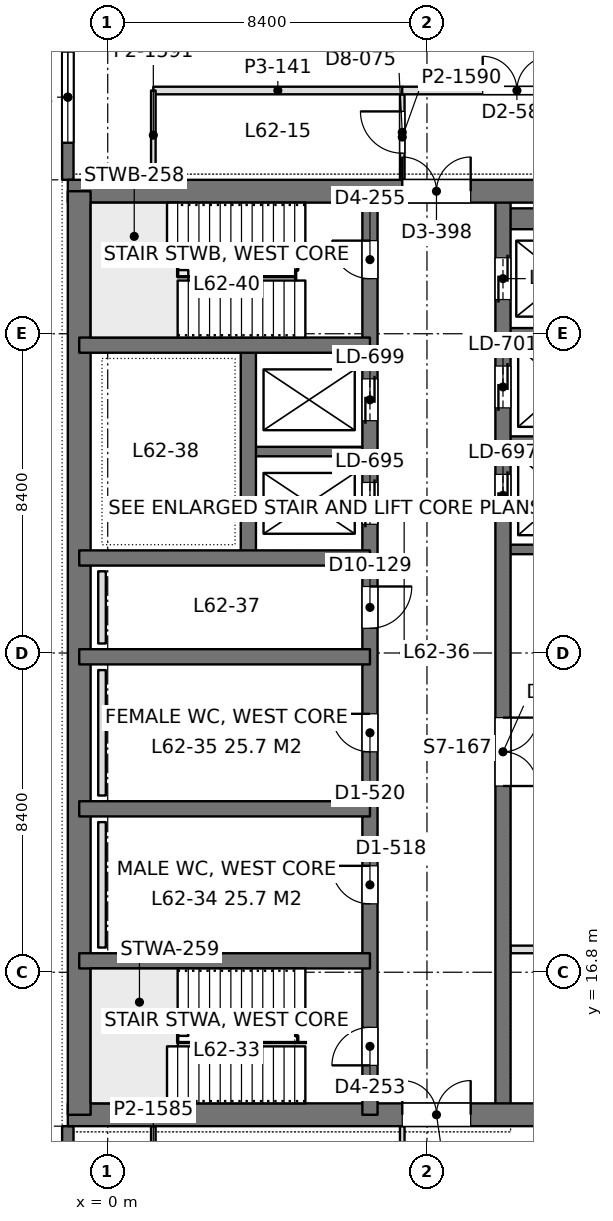
"""IFC4 building model, lengths in metres.
Left out: names, types, materials, properties, quantities, classifications, styles, units other than length and angle.
Written with IfcOpenShell. Run it as: python <this file> out.ifc"""

import sys

from ifc_helpers import new_model, si_unit, direction, frame, frame_2d, origin, place, context, subcontext, project, spatial, rectangle, extrude, element, fill, save


model = new_model("IFC4")
c1 = context("Model", 3, precision=1e-05, world=origin(), true_north=direction((0.0, 1.0)))
c2 = subcontext(c1, "Body", "Model", "MODEL_VIEW")
j1 = project(units=[si_unit("LENGTHUNIT", "METRE"), si_unit("PLANEANGLEUNIT", "RADIAN")], contexts=[c1])
p1 = place(None, origin())
s1 = spatial("IfcSite", under=j1, at=p1, CompositionType="ELEMENT")
p2 = place(p1, origin())
s2 = spatial("IfcBuilding", under=s1, at=p2, CompositionType="ELEMENT")
p3 = place(p2, frame((0.0, 0.0, 272.7)))
s3 = spatial("IfcBuildingStorey", under=s2, at=p3, CompositionType="ELEMENT", Elevation=272.7)
p4 = place(p3, frame((-1.05, 13.05, 0.0), z_axis=(0.0, 0.0, 1.0), x_axis=(1.0, 0.0, 0.0)))
e1 = element("IfcWall", 1, at=p4, inside=s3, PredefinedType="SHEAR", context=c2, shape_type="SweptSolid", body=[
    extrude(rectangle(XDim=17.7, YDim=0.6, at=frame_2d((8.85, 0.0))), origin(), (0.0, 0.0, 1.0), 4.5),
])
p5 = place(p4, frame((8.8, 0.0, 0.0)))
e2 = element("IfcOpeningElement", 2, at=p5, cuts=e1, PredefinedType="OPENING", context=c2, shape_type="SweptSolid", body=[
    extrude(rectangle(XDim=1.8, YDim=2.4, at=frame_2d((0.9, 1.2))), frame((0.0, 0.31, 0.0), z_axis=(0.0, -1.0, 0.0), x_axis=(1.0, 0.0, 0.0)), (0.0, 0.0, 1.0), 0.62),
])
p6 = place(p3, frame((-1.05, 37.35, 0.0), z_axis=(0.0, 0.0, 1.0), x_axis=(1.0, 0.0, 0.0)))
e3 = element("IfcWall", 3, at=p6, inside=s3, PredefinedType="SHEAR", context=c2, shape_type="SweptSolid", body=[
    extrude(rectangle(XDim=17.7, YDim=0.6, at=frame_2d((8.85, 0.0))), origin(), (0.0, 0.0, 1.0), 4.5),
])
p7 = place(p6, frame((8.8, 0.0, 0.0)))
e4 = element("IfcOpeningElement", 4, at=p7, cuts=e3, PredefinedType="OPENING", context=c2, shape_type="SweptSolid", body=[
    extrude(rectangle(XDim=1.8, YDim=2.4, at=frame_2d((0.9, 1.2))), frame((0.0, 0.31, 0.0), z_axis=(0.0, -1.0, 0.0), x_axis=(1.0, 0.0, 0.0)), (0.0, 0.0, 1.0), 0.62),
])
p8 = place(p3, frame((-0.75, 13.05, 0.0), z_axis=(0.0, 0.0, 1.0), x_axis=(0.0, 1.0, 0.0)))
e5 = element("IfcWall", 5, at=p8, inside=s3, PredefinedType="SHEAR", context=c2, shape_type="SweptSolid", body=[
    extrude(rectangle(XDim=24.3, YDim=0.6, at=frame_2d((12.15, 0.0))), origin(), (0.0, 0.0, 1.0), 4.5),
])
p9 = place(p3, frame((6.9, 13.05, 0.0), z_axis=(0.0, 0.0, 1.0), x_axis=(0.0, 1.0, 0.0)))
e6 = element("IfcWall", 6, at=p9, inside=s3, PredefinedType="SHEAR", context=c2, shape_type="SweptSolid", body=[
    extrude(rectangle(XDim=24.3, YDim=0.4, at=frame_2d((12.15, 0.0))), origin(), (0.0, 0.0, 1.0), 4.5),
])
p10 = place(p9, frame((1.3, 0.0, 0.0)))
e7 = element("IfcOpeningElement", 7, at=p10, cuts=e6, PredefinedType="OPENING", context=c2, shape_type="SweptSolid", body=[
    extrude(rectangle(XDim=1.0, YDim=2.2, at=frame_2d((0.5, 1.1))), frame((0.0, 0.21, 0.0), z_axis=(0.0, -1.0, 0.0), x_axis=(1.0, 0.0, 0.0)), (0.0, 0.0, 1.0), 0.42),
])
p11 = place(p9, frame((22.0, 0.0, 0.0)))
e8 = element("IfcOpeningElement", 8, at=p11, cuts=e6, PredefinedType="OPENING", context=c2, shape_type="SweptSolid", body=[
    extrude(rectangle(XDim=1.0, YDim=2.2, at=frame_2d((0.5, 1.1))), frame((0.0, 0.21, 0.0), z_axis=(0.0, -1.0, 0.0), x_axis=(1.0, 0.0, 0.0)), (0.0, 0.0, 1.0), 0.42),
])
p12 = place(p9, frame((5.55, 0.0, 0.0)))
e9 = element("IfcOpeningElement", 9, at=p12, cuts=e6, PredefinedType="OPENING", context=c2, shape_type="SweptSolid", body=[
    extrude(rectangle(XDim=1.0, YDim=2.2, at=frame_2d((0.5, 1.1))), frame((0.0, 0.21, 0.0), z_axis=(0.0, -1.0, 0.0), x_axis=(1.0, 0.0, 0.0)), (0.0, 0.0, 1.0), 0.42),
])
p13 = place(p9, frame((9.55, 0.0, 0.0)))
e10 = element("IfcOpeningElement", 10, at=p13, cuts=e6, PredefinedType="OPENING", context=c2, shape_type="SweptSolid", body=[
    extrude(rectangle(XDim=1.0, YDim=2.2, at=frame_2d((0.5, 1.1))), frame((0.0, 0.21, 0.0), z_axis=(0.0, -1.0, 0.0), x_axis=(1.0, 0.0, 0.0)), (0.0, 0.0, 1.0), 0.42),
])
p14 = place(p9, frame((12.8, 0.0, 0.0)))
e11 = element("IfcOpeningElement", 11, at=p14, cuts=e6, PredefinedType="OPENING", context=c2, shape_type="SweptSolid", body=[
    extrude(rectangle(XDim=1.1, YDim=2.2, at=frame_2d((0.55, 1.1))), frame((0.0, 0.21, 0.0), z_axis=(0.0, -1.0, 0.0), x_axis=(1.0, 0.0, 0.0)), (0.0, 0.0, 1.0), 0.42),
])
p15 = place(p9, frame((15.538, 0.0, 0.0)))
e12 = element("IfcOpeningElement", 12, at=p15, cuts=e6, PredefinedType="OPENING", context=c2, shape_type="SweptSolid", body=[
    extrude(rectangle(XDim=1.1, YDim=2.2, at=frame_2d((0.55, 1.1))), frame((0.0, 0.21, 0.0), z_axis=(0.0, -1.0, 0.0), x_axis=(1.0, 0.0, 0.0)), (0.0, 0.0, 1.0), 0.42),
])
p16 = place(p9, frame((18.262, 0.0, 0.0)))
e13 = element("IfcOpeningElement", 13, at=p16, cuts=e6, PredefinedType="OPENING", context=c2, shape_type="SweptSolid", body=[
    extrude(rectangle(XDim=1.1, YDim=2.2, at=frame_2d((0.55, 1.1))), frame((0.0, 0.21, 0.0), z_axis=(0.0, -1.0, 0.0), x_axis=(1.0, 0.0, 0.0)), (0.0, 0.0, 1.0), 0.42),
])
p17 = place(p3, frame((10.4, 13.05, 0.0), z_axis=(0.0, 0.0, 1.0), x_axis=(0.0, 1.0, 0.0)))
e14 = element("IfcWall", 14, at=p17, inside=s3, PredefinedType="SHEAR", context=c2, shape_type="SweptSolid", body=[
    extrude(rectangle(XDim=24.3, YDim=0.4, at=frame_2d((12.15, 0.0))), origin(), (0.0, 0.0, 1.0), 4.5),
])
p18 = place(p17, frame((15.75, 0.0, 0.0)))
e15 = element("IfcOpeningElement", 15, at=p18, cuts=e14, PredefinedType="OPENING", context=c2, shape_type="SweptSolid", body=[
    extrude(rectangle(XDim=1.1, YDim=2.2, at=frame_2d((0.55, 1.1))), frame((0.0, 0.21, 0.0), z_axis=(0.0, -1.0, 0.0), x_axis=(1.0, 0.0, 0.0)), (0.0, 0.0, 1.0), 0.42),
])
p19 = place(p17, frame((18.6, 0.0, 0.0)))
e16 = element("IfcOpeningElement", 16, at=p19, cuts=e14, PredefinedType="OPENING", context=c2, shape_type="SweptSolid", body=[
    extrude(rectangle(XDim=1.1, YDim=2.2, at=frame_2d((0.55, 1.1))), frame((0.0, 0.21, 0.0), z_axis=(0.0, -1.0, 0.0), x_axis=(1.0, 0.0, 0.0)), (0.0, 0.0, 1.0), 0.42),
])
p20 = place(p17, frame((21.45, 0.0, 0.0)))
e17 = element("IfcOpeningElement", 17, at=p20, cuts=e14, PredefinedType="OPENING", context=c2, shape_type="SweptSolid", body=[
    extrude(rectangle(XDim=1.1, YDim=2.2, at=frame_2d((0.55, 1.1))), frame((0.0, 0.21, 0.0), z_axis=(0.0, -1.0, 0.0), x_axis=(1.0, 0.0, 0.0)), (0.0, 0.0, 1.0), 0.42),
])
p21 = place(p17, frame((8.65, 0.0, 0.0)))
e18 = element("IfcOpeningElement", 18, at=p21, cuts=e14, PredefinedType="OPENING", context=c2, shape_type="SweptSolid", body=[
    extrude(rectangle(XDim=1.8, YDim=2.4, at=frame_2d((0.9, 1.2))), frame((0.0, 0.21, 0.0), z_axis=(0.0, -1.0, 0.0), x_axis=(1.0, 0.0, 0.0)), (0.0, 0.0, 1.0), 0.42),
])
for number, where, z_axis, x_axis in (
    (19, (-0.75, 17.1, 0.0), (0.0, 0.0, 1.0), (1.0, 0.0, 0.0)),
    (20, (-0.75, 21.1, 0.0), (0.0, 0.0, 1.0), (1.0, 0.0, 0.0)),
    (21, (-0.75, 25.1, 0.0), (0.0, 0.0, 1.0), (1.0, 0.0, 0.0)),
    (22, (-0.75, 27.7, 0.0), (0.0, 0.0, 1.0), (1.0, 0.0, 0.0)),
    (23, (-0.75, 33.3, 0.0), (0.0, 0.0, 1.0), (1.0, 0.0, 0.0)),
):
    element("IfcWall", number, at=place(p3, frame(where, z_axis=z_axis, x_axis=x_axis)), inside=s3, PredefinedType="SHEAR", context=c2, shape_type="SweptSolid", body=[
        extrude(rectangle(XDim=7.65, YDim=0.4, at=frame_2d((3.825, 0.0))), origin(), (0.0, 0.0, 1.0), 4.5),
    ])
p22 = place(p3, frame((3.7, 27.7, 0.0), z_axis=(0.0, 0.0, 1.0), x_axis=(0.0, 1.0, 0.0)))
e24 = element("IfcWall", 24, at=p22, inside=s3, PredefinedType="SHEAR", context=c2, shape_type="SweptSolid", body=[
    extrude(rectangle(XDim=5.6, YDim=0.4, at=frame_2d((2.8, 0.0))), origin(), (0.0, 0.0, 1.0), 4.5),
])
p23 = place(p3, frame((3.7, 30.5, 0.0), z_axis=(0.0, 0.0, 1.0), x_axis=(1.0, 0.0, 0.0)))
e25 = element("IfcWall", 25, at=p23, inside=s3, PredefinedType="SHEAR", context=c2, shape_type="SweptSolid", body=[
    extrude(rectangle(XDim=3.2, YDim=0.25, at=frame_2d((1.6, 0.0))), origin(), (0.0, 0.0, 1.0), 4.5),
])
p24 = place(p3, frame((10.4, 27.925, 0.0), z_axis=(0.0, 0.0, 1.0), x_axis=(1.0, 0.0, 0.0)))
e26 = element("IfcWall", 26, at=p24, inside=s3, PredefinedType="SHEAR", context=c2, shape_type="SweptSolid", body=[
    extrude(rectangle(XDim=5.95, YDim=0.25, at=frame_2d((2.975, 0.0))), origin(), (0.0, 0.0, 1.0), 4.5),
])
for number, where, z_axis, x_axis in (
    (27, (10.4, 30.775, 0.0), (0.0, 0.0, 1.0), (1.0, 0.0, 0.0)),
    (28, (10.4, 33.625, 0.0), (0.0, 0.0, 1.0), (1.0, 0.0, 0.0)),
):
    element("IfcWall", number, at=place(p3, frame(where, z_axis=z_axis, x_axis=x_axis)), inside=s3, PredefinedType="SHEAR", context=c2, shape_type="SweptSolid", body=[
        extrude(rectangle(XDim=3.2, YDim=0.25, at=frame_2d((1.6, 0.0))), origin(), (0.0, 0.0, 1.0), 4.5),
    ])
p25 = place(p3, frame((10.4, 36.625, 0.0), z_axis=(0.0, 0.0, 1.0), x_axis=(1.0, 0.0, 0.0)))
e29 = element("IfcWall", 29, at=p25, inside=s3, PredefinedType="SHEAR", context=c2, shape_type="SweptSolid", body=[
    extrude(rectangle(XDim=3.2, YDim=0.55, at=frame_2d((1.6, 0.0))), origin(), (0.0, 0.0, 1.0), 4.5),
])
p26 = place(p3, frame((-1.05, 8.4, 0.0), z_axis=(0.0, 0.0, 1.0), x_axis=(0.0, 1.0, 0.0)))
e30 = element("IfcWall", 30, at=p26, inside=s3, PredefinedType="SOLIDWALL", context=c2, shape_type="SweptSolid", body=[
    extrude(rectangle(XDim=4.35, YDim=0.3, at=frame_2d((2.175, 0.0))), origin(), (0.0, 0.0, 1.0), 4.35),
])
p27 = place(p26, frame((0.975, 0.0, 0.9)))
e31 = element("IfcOpeningElement", 31, at=p27, cuts=e30, PredefinedType="OPENING", context=c2, shape_type="SweptSolid", body=[
    extrude(rectangle(XDim=2.4, YDim=1.9, at=frame_2d((1.2, 0.95))), frame((0.0, 0.16, 0.0), z_axis=(0.0, -1.0, 0.0), x_axis=(1.0, 0.0, 0.0)), (0.0, 0.0, 1.0), 0.32),
])
p28 = place(p3, frame((-1.05, 37.65, 0.0), z_axis=(0.0, 0.0, 1.0), x_axis=(0.0, 1.0, 0.0)))
e32 = element("IfcWall", 32, at=p28, inside=s3, PredefinedType="SOLIDWALL", context=c2, shape_type="SweptSolid", body=[
    extrude(rectangle(XDim=4.35, YDim=0.3, at=frame_2d((2.175, 0.0))), origin(), (0.0, 0.0, 1.0), 4.35),
])
p29 = place(p28, frame((0.975, 0.0, 0.9)))
e33 = element("IfcOpeningElement", 33, at=p29, cuts=e32, PredefinedType="OPENING", context=c2, shape_type="SweptSolid", body=[
    extrude(rectangle(XDim=2.4, YDim=1.9, at=frame_2d((1.2, 0.95))), frame((0.0, 0.16, 0.0), z_axis=(0.0, -1.0, 0.0), x_axis=(1.0, 0.0, 0.0)), (0.0, 0.0, 1.0), 0.32),
])
p30 = place(p3, frame((10.598, 17.4, 0.0), z_axis=(0.0, 0.0, 1.0), x_axis=(1.0, 0.0, 0.0)))
e34 = element("IfcWall", 34, at=p30, inside=s3, PredefinedType="PARTITIONING", context=c2, shape_type="SweptSolid", body=[
    extrude(rectangle(XDim=5.904, YDim=0.2, at=frame_2d((2.952, 0.0))), origin(), (0.0, 0.0, 1.0), 3.8),
])
p31 = place(p3, frame((7.75, 10.498, 0.0), z_axis=(0.0, 0.0, 1.0), x_axis=(0.0, 1.0, 0.0)))
e35 = element("IfcWall", 35, at=p31, inside=s3, PredefinedType="PARTITIONING", context=c2, shape_type="SweptSolid", body=[
    extrude(rectangle(XDim=2.254, YDim=0.12, at=frame_2d((1.127, 0.0))), origin(), (0.0, 0.0, 1.0), 4.35),
])
p32 = place(p31, frame((0.452, 0.0, 0.0)))
e36 = element("IfcOpeningElement", 36, at=p32, cuts=e35, PredefinedType="OPENING", context=c2, shape_type="SweptSolid", body=[
    extrude(rectangle(XDim=1.1, YDim=2.4, at=frame_2d((0.55, 1.2))), frame((0.0, 0.07, 0.0), z_axis=(0.0, -1.0, 0.0), x_axis=(1.0, 0.0, 0.0)), (0.0, 0.0, 1.0), 0.14),
])
p33 = place(p3, frame((1.2, 10.4, 0.0), z_axis=(0.0, 0.0, 1.0), x_axis=(0.0, 1.0, 0.0)))
e37 = element("IfcWall", 37, at=p33, inside=s3, PredefinedType="PARTITIONING", context=c2, shape_type="SweptSolid", body=[
    extrude(rectangle(XDim=2.352, YDim=0.12, at=frame_2d((1.176, 0.0))), origin(), (0.0, 0.0, 1.0), 4.35),
])
p34 = place(p3, frame((7.748, 40.0, 0.0), z_axis=(0.0, 0.0, 1.0), x_axis=(1.0, 0.0, 0.0)))
e38 = element("IfcWall", 38, at=p34, inside=s3, PredefinedType="PARTITIONING", context=c2, shape_type="SweptSolid", body=[
    extrude(rectangle(XDim=41.452, YDim=0.2, at=frame_2d((20.726, 0.0))), origin(), (0.0, 0.0, 1.0), 3.8),
])
p35 = place(p34, frame((2.119, 0.0, 0.0)))
e39 = element("IfcOpeningElement", 39, at=p35, cuts=e38, PredefinedType="OPENING", context=c2, shape_type="SweptSolid", body=[
    extrude(rectangle(XDim=1.8, YDim=2.2, at=frame_2d((0.9, 1.1))), frame((0.0, 0.11, 0.0), z_axis=(0.0, -1.0, 0.0), x_axis=(1.0, 0.0, 0.0)), (0.0, 0.0, 1.0), 0.22),
])
p36 = place(p34, frame((5.135, 0.0, 0.0)))
e40 = element("IfcOpeningElement", 40, at=p36, cuts=e38, PredefinedType="OPENING", context=c2, shape_type="SweptSolid", body=[
    extrude(rectangle(XDim=1.8, YDim=2.2, at=frame_2d((0.9, 1.1))), frame((0.0, 0.11, 0.0), z_axis=(0.0, -1.0, 0.0), x_axis=(1.0, 0.0, 0.0)), (0.0, 0.0, 1.0), 0.22),
])
p37 = place(p34, frame((18.952, 0.0, 0.0)))
e41 = element("IfcOpeningElement", 41, at=p37, cuts=e38, PredefinedType="OPENING", context=c2, shape_type="SweptSolid", body=[
    extrude(rectangle(XDim=1.8, YDim=2.2, at=frame_2d((0.9, 1.1))), frame((0.0, 0.11, 0.0), z_axis=(0.0, -1.0, 0.0), x_axis=(1.0, 0.0, 0.0)), (0.0, 0.0, 1.0), 0.22),
])
p38 = place(p34, frame((29.752, 0.0, 0.0)))
e42 = element("IfcOpeningElement", 42, at=p38, cuts=e38, PredefinedType="OPENING", context=c2, shape_type="SweptSolid", body=[
    extrude(rectangle(XDim=1.8, YDim=2.2, at=frame_2d((0.9, 1.1))), frame((0.0, 0.11, 0.0), z_axis=(0.0, -1.0, 0.0), x_axis=(1.0, 0.0, 0.0)), (0.0, 0.0, 1.0), 0.22),
])
p39 = place(p3, frame((7.75, 37.648, 0.0), z_axis=(0.0, 0.0, 1.0), x_axis=(0.0, 1.0, 0.0)))
e43 = element("IfcWall", 43, at=p39, inside=s3, PredefinedType="PARTITIONING", context=c2, shape_type="SweptSolid", body=[
    extrude(rectangle(XDim=2.254, YDim=0.12, at=frame_2d((1.127, 0.0))), origin(), (0.0, 0.0, 1.0), 4.35),
])
p40 = place(p39, frame((0.702, 0.0, 0.0)))
e44 = element("IfcOpeningElement", 44, at=p40, cuts=e43, PredefinedType="OPENING", context=c2, shape_type="SweptSolid", body=[
    extrude(rectangle(XDim=1.1, YDim=2.4, at=frame_2d((0.55, 1.2))), frame((0.0, 0.07, 0.0), z_axis=(0.0, -1.0, 0.0), x_axis=(1.0, 0.0, 0.0)), (0.0, 0.0, 1.0), 0.14),
])
p41 = place(p3, frame((1.2, 40.0, 0.0), z_axis=(0.0, 0.0, 1.0), x_axis=(1.0, 0.0, 0.0)))
e45 = element("IfcWall", 45, at=p41, inside=s3, PredefinedType="PARTITIONING", context=c2, shape_type="SweptSolid", body=[
    extrude(rectangle(XDim=6.552, YDim=0.2, at=frame_2d((3.276, 0.0))), origin(), (0.0, 0.0, 1.0), 3.99),
])
p42 = place(p3, frame((1.2, 37.648, 0.0), z_axis=(0.0, 0.0, 1.0), x_axis=(0.0, 1.0, 0.0)))
e46 = element("IfcWall", 46, at=p42, inside=s3, PredefinedType="PARTITIONING", context=c2, shape_type="SweptSolid", body=[
    extrude(rectangle(XDim=2.352, YDim=0.12, at=frame_2d((1.176, 0.0))), origin(), (0.0, 0.0, 1.0), 4.35),
])
for number, where, z_axis, x_axis in (
    (47, (-0.15, 17.45, 0.0), (0.0, 0.0, 1.0), (0.0, 1.0, 0.0)),
    (48, (-0.15, 21.45, 0.0), (0.0, 0.0, 1.0), (0.0, 1.0, 0.0)),
):
    element("IfcWall", number, at=place(p3, frame(where, z_axis=z_axis, x_axis=x_axis)), inside=s3, PredefinedType="PLUMBINGWALL", context=c2, shape_type="SweptSolid", body=[
        extrude(rectangle(XDim=3.3, YDim=0.2, at=frame_2d((1.65, 0.0))), origin(), (0.0, 0.0, 1.0), 1.2),
    ])
p43 = place(p3, frame((-0.15, 25.45, 0.0), z_axis=(0.0, 0.0, 1.0), x_axis=(0.0, 1.0, 0.0)))
e49 = element("IfcWall", 49, at=p43, inside=s3, PredefinedType="PLUMBINGWALL", context=c2, shape_type="SweptSolid", body=[
    extrude(rectangle(XDim=1.9, YDim=0.2, at=frame_2d((0.95, 0.0))), origin(), (0.0, 0.0, 1.0), 1.2),
])
p44 = place(p29, origin())
e50 = element("IfcWindow", 50, at=p44, inside=s3, PartitioningType="SINGLE_PANEL", PredefinedType="WINDOW", context=c2, shape_type="SweptSolid", body=[
    extrude(rectangle(XDim=2.4, YDim=1.9, at=frame_2d((1.2, 0.95))), frame((0.0, 0.03, 0.0), z_axis=(0.0, -1.0, 0.0), x_axis=(1.0, 0.0, 0.0)), (0.0, 0.0, 1.0), 0.06),
])
fill(e33, e50)
p45 = place(p5, origin())
e51 = element("IfcDoor", 51, at=p45, inside=s3, OperationType="DOUBLE_DOOR_SINGLE_SWING", PredefinedType="DOOR", context=c2, shape_type="SweptSolid", body=[
    extrude(rectangle(XDim=1.8, YDim=2.4, at=frame_2d((0.9, 1.2))), frame((0.0, 0.025, 0.0), z_axis=(0.0, -1.0, 0.0), x_axis=(1.0, 0.0, 0.0)), (0.0, 0.0, 1.0), 0.05),
])
fill(e2, e51)
p46 = place(p7, origin())
e52 = element("IfcDoor", 52, at=p46, inside=s3, OperationType="DOUBLE_DOOR_SINGLE_SWING", PredefinedType="DOOR", context=c2, shape_type="SweptSolid", body=[
    extrude(rectangle(XDim=1.8, YDim=2.4, at=frame_2d((0.9, 1.2))), frame((0.0, 0.025, 0.0), z_axis=(0.0, -1.0, 0.0), x_axis=(1.0, 0.0, 0.0)), (0.0, 0.0, 1.0), 0.05),
])
fill(e4, e52)
p47 = place(p10, origin())
e53 = element("IfcDoor", 53, at=p47, inside=s3, OperationType="SINGLE_SWING_LEFT", PredefinedType="DOOR", context=c2, shape_type="SweptSolid", body=[
    extrude(rectangle(XDim=1.0, YDim=2.2, at=frame_2d((0.5, 1.1))), frame((0.0, 0.025, 0.0), z_axis=(0.0, -1.0, 0.0), x_axis=(1.0, 0.0, 0.0)), (0.0, 0.0, 1.0), 0.05),
])
fill(e7, e53)
p48 = place(p11, origin())
e54 = element("IfcDoor", 54, at=p48, inside=s3, OperationType="SINGLE_SWING_RIGHT", PredefinedType="DOOR", context=c2, shape_type="SweptSolid", body=[
    extrude(rectangle(XDim=1.0, YDim=2.2, at=frame_2d((0.5, 1.1))), frame((0.0, 0.025, 0.0), z_axis=(0.0, -1.0, 0.0), x_axis=(1.0, 0.0, 0.0)), (0.0, 0.0, 1.0), 0.05),
])
fill(e8, e54)
p49 = place(p12, origin())
e55 = element("IfcDoor", 55, at=p49, inside=s3, OperationType="SINGLE_SWING_RIGHT", PredefinedType="DOOR", context=c2, shape_type="SweptSolid", body=[
    extrude(rectangle(XDim=1.0, YDim=2.2, at=frame_2d((0.5, 1.1))), frame((0.0, 0.025, 0.0), z_axis=(0.0, -1.0, 0.0), x_axis=(1.0, 0.0, 0.0)), (0.0, 0.0, 1.0), 0.05),
])
fill(e9, e55)
p50 = place(p13, origin())
e56 = element("IfcDoor", 56, at=p50, inside=s3, OperationType="SINGLE_SWING_RIGHT", PredefinedType="DOOR", context=c2, shape_type="SweptSolid", body=[
    extrude(rectangle(XDim=1.0, YDim=2.2, at=frame_2d((0.5, 1.1))), frame((0.0, 0.025, 0.0), z_axis=(0.0, -1.0, 0.0), x_axis=(1.0, 0.0, 0.0)), (0.0, 0.0, 1.0), 0.05),
])
fill(e10, e56)
p51 = place(p14, frame((1.1, 0.0, 0.0), z_axis=(0.0, 0.0, 1.0), x_axis=(-1.0, 0.0, 0.0)))
e57 = element("IfcDoor", 57, at=p51, inside=s3, OperationType="SINGLE_SWING_LEFT", PredefinedType="DOOR", context=c2, shape_type="SweptSolid", body=[
    extrude(rectangle(XDim=1.1, YDim=2.2, at=frame_2d((0.55, 1.1))), frame((0.0, 0.025, 0.0), z_axis=(0.0, -1.0, 0.0), x_axis=(1.0, 0.0, 0.0)), (0.0, 0.0, 1.0), 0.05),
])
fill(e11, e57)
p52 = place(p18, origin())
e58 = element("IfcDoor", 58, at=p52, inside=s3, OperationType="DOUBLE_DOOR_SLIDING", PredefinedType="DOOR", context=c2, shape_type="SweptSolid", body=[
    extrude(rectangle(XDim=1.1, YDim=2.2, at=frame_2d((0.55, 1.1))), frame((0.0, 0.025, 0.0), z_axis=(0.0, -1.0, 0.0), x_axis=(1.0, 0.0, 0.0)), (0.0, 0.0, 1.0), 0.05),
])
fill(e15, e58)
p53 = place(p19, origin())
e59 = element("IfcDoor", 59, at=p53, inside=s3, OperationType="DOUBLE_DOOR_SLIDING", PredefinedType="DOOR", context=c2, shape_type="SweptSolid", body=[
    extrude(rectangle(XDim=1.1, YDim=2.2, at=frame_2d((0.55, 1.1))), frame((0.0, 0.025, 0.0), z_axis=(0.0, -1.0, 0.0), x_axis=(1.0, 0.0, 0.0)), (0.0, 0.0, 1.0), 0.05),
])
fill(e16, e59)
p54 = place(p20, origin())
e60 = element("IfcDoor", 60, at=p54, inside=s3, OperationType="DOUBLE_DOOR_SLIDING", PredefinedType="DOOR", context=c2, shape_type="SweptSolid", body=[
    extrude(rectangle(XDim=1.1, YDim=2.2, at=frame_2d((0.55, 1.1))), frame((0.0, 0.025, 0.0), z_axis=(0.0, -1.0, 0.0), x_axis=(1.0, 0.0, 0.0)), (0.0, 0.0, 1.0), 0.05),
])
fill(e17, e60)
p55 = place(p15, origin())
e61 = element("IfcDoor", 61, at=p55, inside=s3, OperationType="DOUBLE_DOOR_SLIDING", PredefinedType="DOOR", context=c2, shape_type="SweptSolid", body=[
    extrude(rectangle(XDim=1.1, YDim=2.2, at=frame_2d((0.55, 1.1))), frame((0.0, 0.025, 0.0), z_axis=(0.0, -1.0, 0.0), x_axis=(1.0, 0.0, 0.0)), (0.0, 0.0, 1.0), 0.05),
])
fill(e12, e61)
p56 = place(p16, origin())
e62 = element("IfcDoor", 62, at=p56, inside=s3, OperationType="DOUBLE_DOOR_SLIDING", PredefinedType="DOOR", context=c2, shape_type="SweptSolid", body=[
    extrude(rectangle(XDim=1.1, YDim=2.2, at=frame_2d((0.55, 1.1))), frame((0.0, 0.025, 0.0), z_axis=(0.0, -1.0, 0.0), x_axis=(1.0, 0.0, 0.0)), (0.0, 0.0, 1.0), 0.05),
])
fill(e13, e62)
p57 = place(p21, frame((1.8, 0.0, 0.0), z_axis=(0.0, 0.0, 1.0), x_axis=(-1.0, 0.0, 0.0)))
e63 = element("IfcDoor", 63, at=p57, inside=s3, OperationType="DOUBLE_DOOR_SINGLE_SWING", PredefinedType="DOOR", context=c2, shape_type="SweptSolid", body=[
    extrude(rectangle(XDim=1.8, YDim=2.4, at=frame_2d((0.9, 1.2))), frame((0.0, 0.025, 0.0), z_axis=(0.0, -1.0, 0.0), x_axis=(1.0, 0.0, 0.0)), (0.0, 0.0, 1.0), 0.05),
])
fill(e18, e63)
p58 = place(p35, origin())
e64 = element("IfcDoor", 64, at=p58, inside=s3, OperationType="DOUBLE_DOOR_SINGLE_SWING", PredefinedType="DOOR", context=c2, shape_type="SweptSolid", body=[
    extrude(rectangle(XDim=1.8, YDim=2.2, at=frame_2d((0.9, 1.1))), frame((0.0, 0.025, 0.0), z_axis=(0.0, -1.0, 0.0), x_axis=(1.0, 0.0, 0.0)), (0.0, 0.0, 1.0), 0.05),
])
fill(e39, e64)
p59 = place(p40, origin())
e65 = element("IfcDoor", 65, at=p59, inside=s3, OperationType="SINGLE_SWING_RIGHT", PredefinedType="DOOR", context=c2, shape_type="SweptSolid", body=[
    extrude(rectangle(XDim=1.1, YDim=2.4, at=frame_2d((0.55, 1.2))), frame((0.0, 0.025, 0.0), z_axis=(0.0, -1.0, 0.0), x_axis=(1.0, 0.0, 0.0)), (0.0, 0.0, 1.0), 0.05),
])
fill(e44, e65)
save(model, sys.argv[1])
